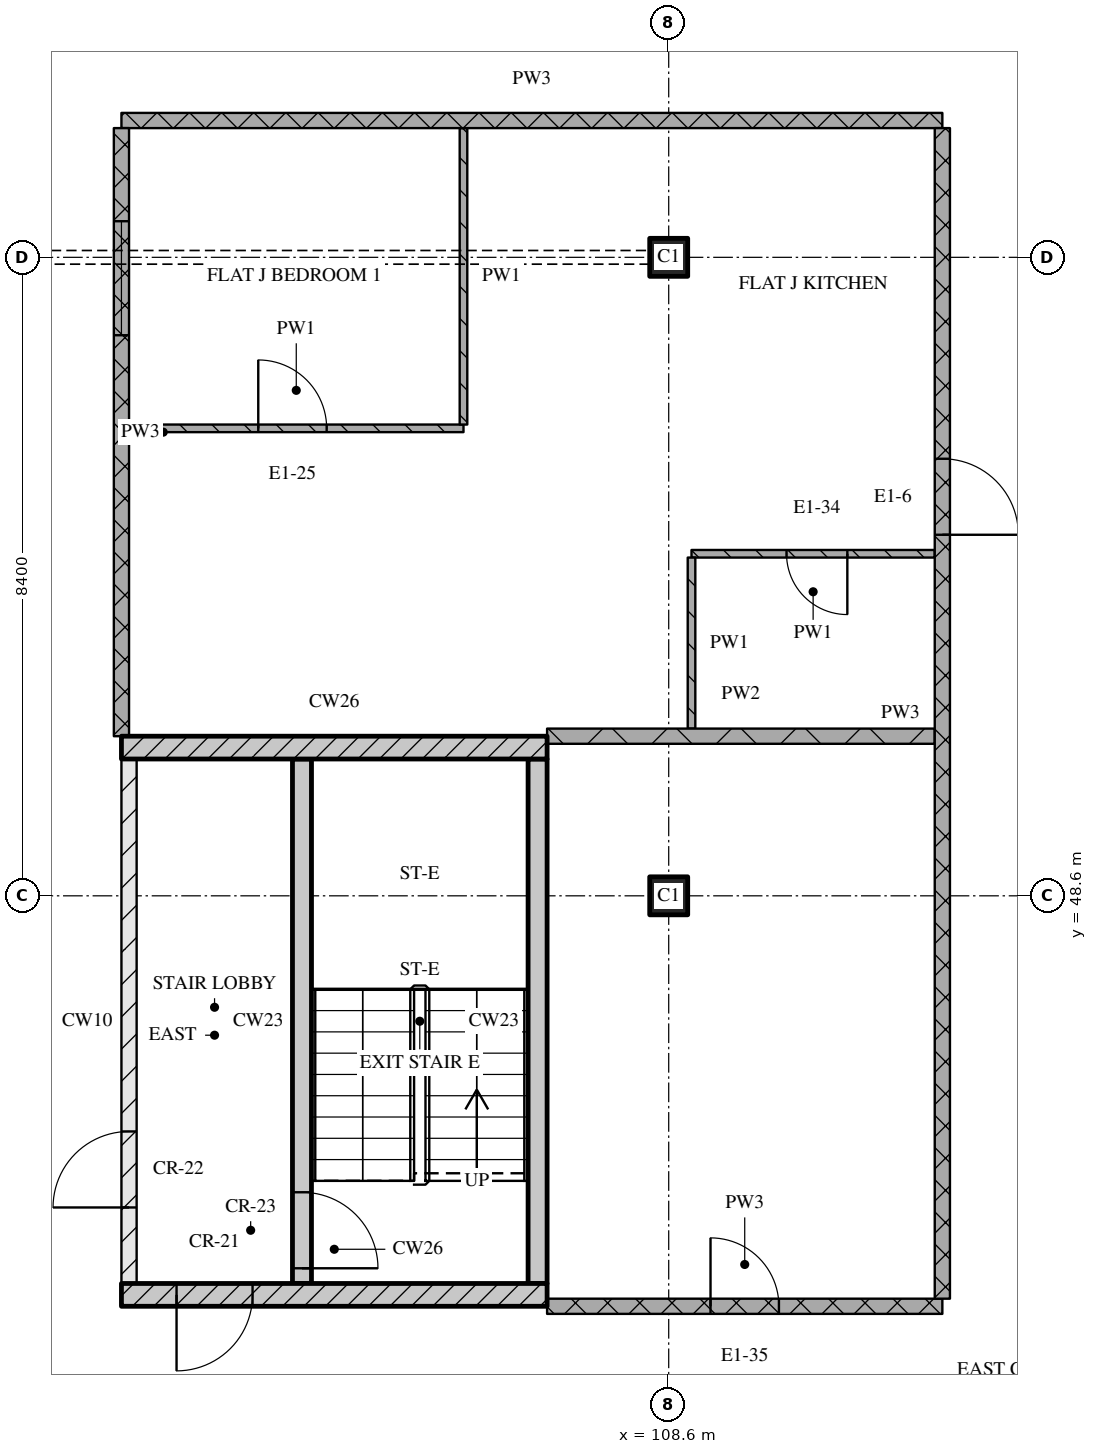
"""IFC4 building model, lengths in metres.
Left out: names, types, materials, properties, quantities, classifications, styles, units other than length and angle.
Written with IfcOpenShell. Run it as: python <this file> out.ifc"""

import sys

from ifc_helpers import new_model, si_unit, direction, frame, frame_2d, origin, origin_2d, place, context, subcontext, project, spatial, rectangle, extrude, element, fill, save


model = new_model("IFC4")
c1 = context("Model", 3, precision=1e-05, world=origin(), true_north=direction((0.0, 1.0)))
c2 = subcontext(c1, "Body", "Model", "MODEL_VIEW")
j1 = project(units=[si_unit("LENGTHUNIT", "METRE"), si_unit("PLANEANGLEUNIT", "RADIAN")], contexts=[c1])
p1 = place(None, origin())
s1 = spatial("IfcSite", under=j1, at=p1, CompositionType="ELEMENT")
p2 = place(p1, origin())
s2 = spatial("IfcBuilding", under=s1, at=p2, CompositionType="ELEMENT")
p3 = place(p2, frame((0.0, 0.0, 263.55)))
s3 = spatial("IfcBuildingStorey", under=s2, at=p3, CompositionType="ELEMENT", Elevation=263.55)
for number, where, z_axis, x_axis in (
    (1, (108.6, 48.6, 0.0), (0.0, 0.0, 1.0), (1.0, 0.0, 0.0)),
    (2, (108.6, 57.0, 0.0), (0.0, 0.0, 1.0), (1.0, 0.0, 0.0)),
):
    element("IfcColumn", number, at=place(p3, frame(where, z_axis=z_axis, x_axis=x_axis)), inside=s3, PredefinedType="COLUMN", context=c2, shape_type="SweptSolid", body=[
        extrude(rectangle(XDim=0.5, YDim=0.5, at=origin_2d()), origin(), (0.0, 0.0, 1.0), 3.6),
    ])
p4 = place(p3, frame((101.4, 43.35, 0.0), z_axis=(0.0, 0.0, 1.0), x_axis=(1.0, 0.0, 0.0)))
e3 = element("IfcWall", 3, at=p4, inside=s3, PredefinedType="SOLIDWALL", context=c2, shape_type="SweptSolid", body=[
    extrude(rectangle(XDim=5.6, YDim=0.3, at=frame_2d((2.8, 0.0))), origin(), (0.0, 0.0, 1.0), 3.32),
])
p5 = place(p4, frame((0.725, 0.0, 0.0)))
e4 = element("IfcOpeningElement", 4, at=p5, cuts=e3, PredefinedType="OPENING", context=c2, shape_type="SweptSolid", body=[
    extrude(rectangle(XDim=1.0, YDim=2.1, at=frame_2d((0.5, 1.05))), frame((0.0, 0.16, 0.0), z_axis=(0.0, -1.0, 0.0), x_axis=(1.0, 0.0, 0.0)), (0.0, 0.0, 1.0), 0.32),
])
p6 = place(p3, frame((101.5, 43.5, 0.0), z_axis=(0.0, 0.0, 1.0), x_axis=(0.0, 1.0, 0.0)))
e5 = element("IfcWall", 5, at=p6, inside=s3, PredefinedType="PARTITIONING", context=c2, shape_type="SweptSolid", body=[
    extrude(rectangle(XDim=6.9, YDim=0.2, at=frame_2d((3.45, 0.0))), origin(), (0.0, 0.0, 1.0), 3.32),
])
p7 = place(p6, frame((1.0, 0.0, 0.0)))
e6 = element("IfcOpeningElement", 6, at=p7, cuts=e5, PredefinedType="OPENING", context=c2, shape_type="SweptSolid", body=[
    extrude(rectangle(XDim=1.0, YDim=2.1, at=frame_2d((0.5, 1.05))), frame((0.0, 0.11, 0.0), z_axis=(0.0, -1.0, 0.0), x_axis=(1.0, 0.0, 0.0)), (0.0, 0.0, 1.0), 0.22),
])
p8 = place(p3, frame((103.775, 43.5, 0.0), z_axis=(0.0, 0.0, 1.0), x_axis=(0.0, 1.0, 0.0)))
e7 = element("IfcWall", 7, at=p8, inside=s3, PredefinedType="SOLIDWALL", context=c2, shape_type="SweptSolid", body=[
    extrude(rectangle(XDim=6.9, YDim=0.25, at=frame_2d((3.45, 0.0))), origin(), (0.0, 0.0, 1.0), 3.32),
])
p9 = place(p8, frame((0.2, 0.0, 0.0)))
e8 = element("IfcOpeningElement", 8, at=p9, cuts=e7, PredefinedType="OPENING", context=c2, shape_type="SweptSolid", body=[
    extrude(rectangle(XDim=1.0, YDim=2.1, at=frame_2d((0.5, 1.05))), frame((0.0, 0.135, 0.0), z_axis=(0.0, -1.0, 0.0), x_axis=(1.0, 0.0, 0.0)), (0.0, 0.0, 1.0), 0.27),
])
p10 = place(p3, frame((106.875, 43.5, 0.0), z_axis=(0.0, 0.0, 1.0), x_axis=(0.0, 1.0, 0.0)))
e9 = element("IfcWall", 9, at=p10, inside=s3, PredefinedType="SOLIDWALL", context=c2, shape_type="SweptSolid", body=[
    extrude(rectangle(XDim=6.9, YDim=0.25, at=frame_2d((3.45, 0.0))), origin(), (0.0, 0.0, 1.0), 3.32),
])
p11 = place(p3, frame((101.4, 50.55, 0.0), z_axis=(0.0, 0.0, 1.0), x_axis=(1.0, 0.0, 0.0)))
e10 = element("IfcWall", 10, at=p11, inside=s3, PredefinedType="SOLIDWALL", context=c2, shape_type="SweptSolid", body=[
    extrude(rectangle(XDim=5.6, YDim=0.3, at=frame_2d((2.8, 0.0))), origin(), (0.0, 0.0, 1.0), 3.32),
])
p12 = place(p3, frame((107.0, 43.2, 0.0), z_axis=(0.0, 0.0, 1.0), x_axis=(1.0, 0.0, 0.0)))
e11 = element("IfcWall", 11, at=p12, inside=s3, PredefinedType="PARTITIONING", context=c2, shape_type="SweptSolid", body=[
    extrude(rectangle(XDim=5.2, YDim=0.2, at=frame_2d((2.6, 0.0))), origin(), (0.0, 0.0, 1.0), 3.32),
])
p13 = place(p12, frame((2.15, 0.0, 0.0)))
e12 = element("IfcOpeningElement", 12, at=p13, cuts=e11, PredefinedType="OPENING", context=c2, shape_type="SweptSolid", body=[
    extrude(rectangle(XDim=0.9, YDim=2.1, at=frame_2d((0.45, 1.05))), frame((0.0, 0.11, 0.0), z_axis=(0.0, -1.0, 0.0), x_axis=(1.0, 0.0, 0.0)), (0.0, 0.0, 1.0), 0.22),
])
p14 = place(p3, frame((107.0, 50.7, 0.0), z_axis=(0.0, 0.0, 1.0), x_axis=(1.0, 0.0, 0.0)))
e13 = element("IfcWall", 13, at=p14, inside=s3, PredefinedType="PARTITIONING", context=c2, shape_type="SweptSolid", body=[
    extrude(rectangle(XDim=5.1, YDim=0.2, at=frame_2d((2.55, 0.0))), origin(), (0.0, 0.0, 1.0), 3.32),
])
p15 = place(p3, frame((112.1, 53.1, 0.0), z_axis=(0.0, 0.0, 1.0), x_axis=(-1.0, 0.0, 0.0)))
e14 = element("IfcWall", 14, at=p15, inside=s3, PredefinedType="PARTITIONING", context=c2, shape_type="SweptSolid", body=[
    extrude(rectangle(XDim=3.2, YDim=0.1, at=frame_2d((1.6, 0.0))), origin(), (0.0, 0.0, 1.0), 3.32),
])
p16 = place(p15, frame((1.15, 0.0, 0.0)))
e15 = element("IfcOpeningElement", 15, at=p16, cuts=e14, PredefinedType="OPENING", context=c2, shape_type="SweptSolid", body=[
    extrude(rectangle(XDim=0.8, YDim=2.1, at=frame_2d((0.4, 1.05))), frame((0.0, 0.06, 0.0), z_axis=(0.0, -1.0, 0.0), x_axis=(1.0, 0.0, 0.0)), (0.0, 0.0, 1.0), 0.12),
])
p17 = place(p3, frame((101.5, 54.75, 0.0), z_axis=(0.0, 0.0, 1.0), x_axis=(1.0, 0.0, 0.0)))
e16 = element("IfcWall", 16, at=p17, inside=s3, PredefinedType="PARTITIONING", context=c2, shape_type="SweptSolid", body=[
    extrude(rectangle(XDim=4.4, YDim=0.1, at=frame_2d((2.2, 0.0))), origin(), (0.0, 0.0, 1.0), 3.32),
])
p18 = place(p17, frame((1.7, 0.0, 0.0)))
e17 = element("IfcOpeningElement", 17, at=p18, cuts=e16, PredefinedType="OPENING", context=c2, shape_type="SweptSolid", body=[
    extrude(rectangle(XDim=0.9, YDim=2.1, at=frame_2d((0.45, 1.05))), frame((0.0, 0.06, 0.0), z_axis=(0.0, -1.0, 0.0), x_axis=(1.0, 0.0, 0.0)), (0.0, 0.0, 1.0), 0.12),
])
p19 = place(p3, frame((101.4, 58.8, 0.0), z_axis=(0.0, 0.0, 1.0), x_axis=(1.0, 0.0, 0.0)))
e18 = element("IfcWall", 18, at=p19, inside=s3, PredefinedType="PARTITIONING", context=c2, shape_type="SweptSolid", body=[
    extrude(rectangle(XDim=10.8, YDim=0.2, at=frame_2d((5.4, 0.0))), origin(), (0.0, 0.0, 1.0), 3.32),
])
p20 = place(p3, frame((101.4, 58.7, 0.0), z_axis=(0.0, 0.0, 1.0), x_axis=(0.0, -1.0, 0.0)))
e19 = element("IfcWall", 19, at=p20, inside=s3, PredefinedType="PARTITIONING", context=c2, shape_type="SweptSolid", body=[
    extrude(rectangle(XDim=8.0, YDim=0.2, at=frame_2d((4.0, 0.0))), origin(), (0.0, 0.0, 1.0), 3.32),
])
p21 = place(p20, frame((1.225, 0.0, 0.9)))
e20 = element("IfcOpeningElement", 20, at=p21, cuts=e19, PredefinedType="OPENING", context=c2, shape_type="SweptSolid", body=[
    extrude(rectangle(XDim=1.5, YDim=1.5, at=frame_2d((0.75, 0.75))), frame((0.0, 0.11, 0.0), z_axis=(0.0, -1.0, 0.0), x_axis=(1.0, 0.0, 0.0)), (0.0, 0.0, 1.0), 0.22),
])
p22 = place(p3, frame((105.9, 58.7, 0.0), z_axis=(0.0, 0.0, 1.0), x_axis=(0.0, -1.0, 0.0)))
e21 = element("IfcWall", 21, at=p22, inside=s3, PredefinedType="PARTITIONING", context=c2, shape_type="SweptSolid", body=[
    extrude(rectangle(XDim=3.9, YDim=0.1, at=frame_2d((1.95, 0.0))), origin(), (0.0, 0.0, 1.0), 3.32),
])
p23 = place(p3, frame((108.9, 53.05, 0.0), z_axis=(0.0, 0.0, 1.0), x_axis=(0.0, -1.0, 0.0)))
e22 = element("IfcWall", 22, at=p23, inside=s3, PredefinedType="PARTITIONING", context=c2, shape_type="SweptSolid", body=[
    extrude(rectangle(XDim=2.25, YDim=0.1, at=frame_2d((1.125, 0.0))), origin(), (0.0, 0.0, 1.0), 3.32),
])
p24 = place(p3, frame((112.2, 43.3, 0.0), z_axis=(0.0, 0.0, 1.0), x_axis=(0.0, 1.0, 0.0)))
e23 = element("IfcWall", 23, at=p24, inside=s3, PredefinedType="PARTITIONING", context=c2, shape_type="SweptSolid", body=[
    extrude(rectangle(XDim=15.4, YDim=0.2, at=frame_2d((7.7, 0.0))), origin(), (0.0, 0.0, 1.0), 3.32),
])
p25 = place(p24, frame((10.05, 0.0, 0.0)))
e24 = element("IfcOpeningElement", 24, at=p25, cuts=e23, PredefinedType="OPENING", context=c2, shape_type="SweptSolid", body=[
    extrude(rectangle(XDim=1.0, YDim=2.1, at=frame_2d((0.5, 1.05))), frame((0.0, 0.11, 0.0), z_axis=(0.0, -1.0, 0.0), x_axis=(1.0, 0.0, 0.0)), (0.0, 0.0, 1.0), 0.22),
])
p26 = place(p5, origin())
e25 = element("IfcDoor", 25, at=p26, inside=s3, OperationType="SINGLE_SWING_RIGHT", PredefinedType="DOOR", context=c2, shape_type="SweptSolid", body=[
    extrude(rectangle(XDim=1.0, YDim=2.1, at=frame_2d((0.5, 1.05))), frame((0.0, 0.025, 0.0), z_axis=(0.0, -1.0, 0.0), x_axis=(1.0, 0.0, 0.0)), (0.0, 0.0, 1.0), 0.05),
])
fill(e4, e25)
p27 = place(p9, origin())
e26 = element("IfcDoor", 26, at=p27, inside=s3, OperationType="SINGLE_SWING_RIGHT", PredefinedType="DOOR", context=c2, shape_type="SweptSolid", body=[
    extrude(rectangle(XDim=1.0, YDim=2.1, at=frame_2d((0.5, 1.05))), frame((0.0, 0.025, 0.0), z_axis=(0.0, -1.0, 0.0), x_axis=(1.0, 0.0, 0.0)), (0.0, 0.0, 1.0), 0.05),
])
fill(e8, e26)
p28 = place(p7, origin())
e27 = element("IfcDoor", 27, at=p28, inside=s3, OperationType="SINGLE_SWING_LEFT", PredefinedType="DOOR", context=c2, shape_type="SweptSolid", body=[
    extrude(rectangle(XDim=1.0, YDim=2.1, at=frame_2d((0.5, 1.05))), frame((0.0, 0.025, 0.0), z_axis=(0.0, -1.0, 0.0), x_axis=(1.0, 0.0, 0.0)), (0.0, 0.0, 1.0), 0.05),
])
fill(e6, e27)
p29 = place(p13, origin())
e28 = element("IfcDoor", 28, at=p29, inside=s3, OperationType="SINGLE_SWING_LEFT", PredefinedType="DOOR", context=c2, shape_type="SweptSolid", body=[
    extrude(rectangle(XDim=0.9, YDim=2.1, at=frame_2d((0.45, 1.05))), frame((0.0, 0.025, 0.0), z_axis=(0.0, -1.0, 0.0), x_axis=(1.0, 0.0, 0.0)), (0.0, 0.0, 1.0), 0.05),
])
fill(e12, e28)
p30 = place(p16, origin())
e29 = element("IfcDoor", 29, at=p30, inside=s3, OperationType="SINGLE_SWING_LEFT", PredefinedType="DOOR", context=c2, shape_type="SweptSolid", body=[
    extrude(rectangle(XDim=0.8, YDim=2.1, at=frame_2d((0.4, 1.05))), frame((0.0, 0.025, 0.0), z_axis=(0.0, -1.0, 0.0), x_axis=(1.0, 0.0, 0.0)), (0.0, 0.0, 1.0), 0.05),
])
fill(e15, e29)
p31 = place(p18, origin())
e30 = element("IfcDoor", 30, at=p31, inside=s3, OperationType="SINGLE_SWING_LEFT", PredefinedType="DOOR", context=c2, shape_type="SweptSolid", body=[
    extrude(rectangle(XDim=0.9, YDim=2.1, at=frame_2d((0.45, 1.05))), frame((0.0, 0.025, 0.0), z_axis=(0.0, -1.0, 0.0), x_axis=(1.0, 0.0, 0.0)), (0.0, 0.0, 1.0), 0.05),
])
fill(e17, e30)
p32 = place(p25, origin())
e31 = element("IfcDoor", 31, at=p32, inside=s3, OperationType="SINGLE_SWING_RIGHT", PredefinedType="DOOR", context=c2, shape_type="SweptSolid", body=[
    extrude(rectangle(XDim=1.0, YDim=2.1, at=frame_2d((0.5, 1.05))), frame((0.0, 0.025, 0.0), z_axis=(0.0, -1.0, 0.0), x_axis=(1.0, 0.0, 0.0)), (0.0, 0.0, 1.0), 0.05),
])
fill(e24, e31)
p33 = place(p21, origin())
e32 = element("IfcWindow", 32, at=p33, inside=s3, PartitioningType="SINGLE_PANEL", PredefinedType="WINDOW", context=c2, shape_type="SweptSolid", body=[
    extrude(rectangle(XDim=1.5, YDim=1.5, at=frame_2d((0.75, 0.75))), frame((0.0, 0.03, 0.0), z_axis=(0.0, -1.0, 0.0), x_axis=(1.0, 0.0, 0.0)), (0.0, 0.0, 1.0), 0.06),
])
fill(e20, e32)
save(model, sys.argv[1])
